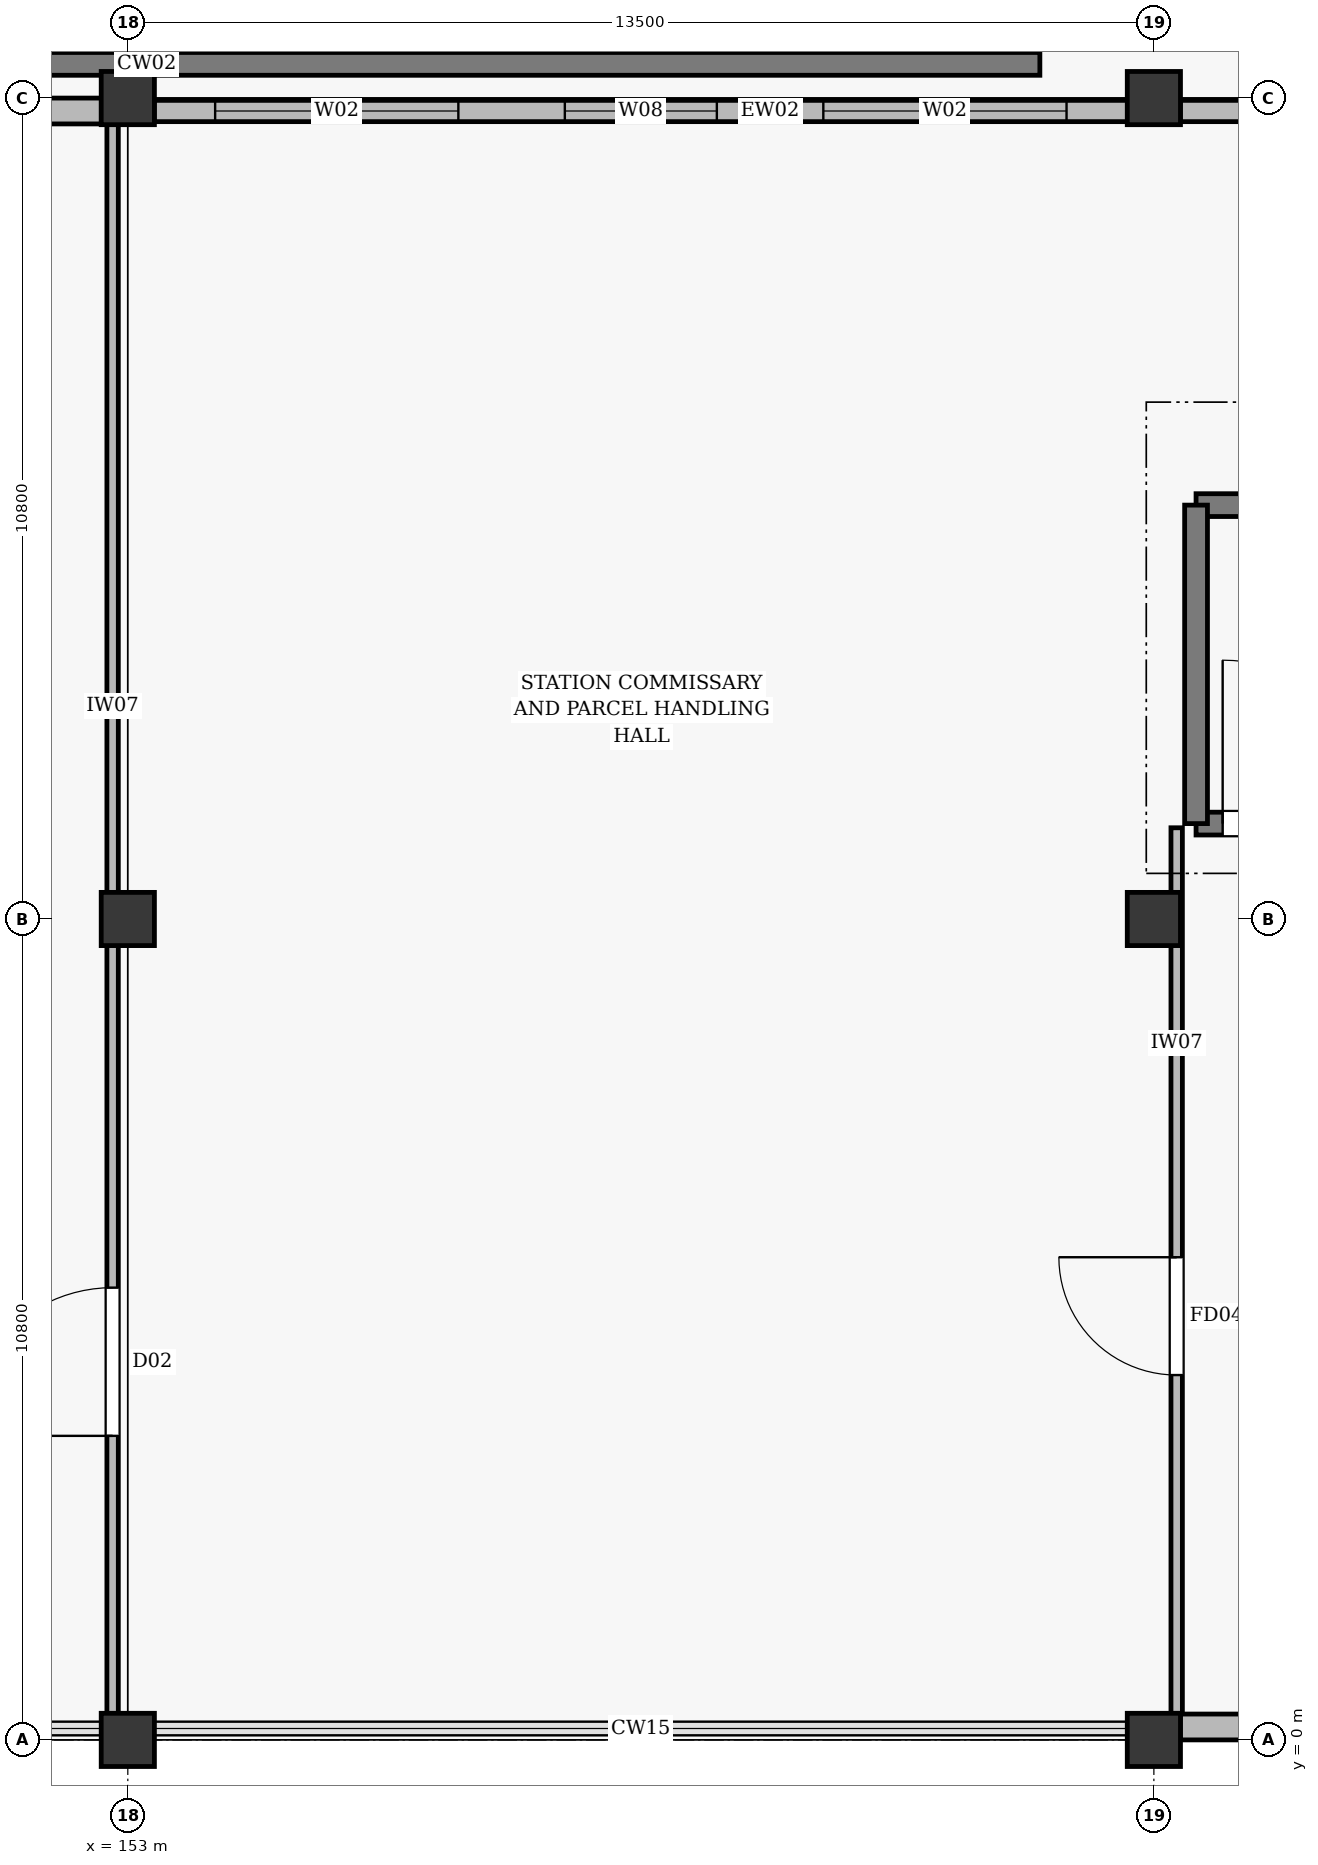
"""IFC4 building model, lengths in metres.
Left out: names, types, materials, properties, quantities, classifications, styles, units other than length and angle.
Written with IfcOpenShell. Run it as: python <this file> out.ifc"""

import sys

from ifc_helpers import new_model, si_unit, direction, frame, frame_2d, origin, origin_2d, place, context, subcontext, project, spatial, rectangle, extrude, element, fill, save


model = new_model("IFC4")
c1 = context("Model", 3, precision=1e-05, world=origin(), true_north=direction((0.0, 1.0)))
c2 = subcontext(c1, "Body", "Model", "MODEL_VIEW")
j1 = project(units=[si_unit("LENGTHUNIT", "METRE"), si_unit("PLANEANGLEUNIT", "RADIAN")], contexts=[c1])
p1 = place(None, origin())
s1 = spatial("IfcSite", under=j1, at=p1, CompositionType="ELEMENT")
p2 = place(p1, origin())
s2 = spatial("IfcBuilding", under=s1, at=p2, CompositionType="ELEMENT")
p3 = place(p2, origin())
s3 = spatial("IfcBuildingStorey", under=s2, at=p3, CompositionType="ELEMENT", Elevation=0.0)
for number, where, z_axis, x_axis in (
    (1, (153.0, 0.0, 0.0), (0.0, 0.0, 1.0), (1.0, 0.0, 0.0)),
    (2, (153.0, 10.8, 0.0), (0.0, 0.0, 1.0), (1.0, 0.0, 0.0)),
    (3, (153.0, 21.6, 0.0), (0.0, 0.0, 1.0), (1.0, 0.0, 0.0)),
    (4, (166.5, 0.0, 0.0), (0.0, 0.0, 1.0), (1.0, 0.0, 0.0)),
    (5, (166.5, 10.8, 0.0), (0.0, 0.0, 1.0), (1.0, 0.0, 0.0)),
    (6, (166.5, 21.6, 0.0), (0.0, 0.0, 1.0), (1.0, 0.0, 0.0)),
):
    element("IfcColumn", number, at=place(p3, frame(where, z_axis=z_axis, x_axis=x_axis)), inside=s3, PredefinedType="COLUMN", context=c2, shape_type="SweptSolid", body=[
        extrude(rectangle(XDim=0.7, YDim=0.7, at=origin_2d()), origin(), (0.0, 0.0, 1.0), 6.6),
    ])
p4 = place(p3, frame((141.5, 22.05, 0.0), z_axis=(0.0, 0.0, 1.0), x_axis=(1.0, 0.0, 0.0)))
e7 = element("IfcWall", 7, at=p4, inside=s3, PredefinedType="SOLIDWALL", context=c2, shape_type="SweptSolid", body=[
    extrude(rectangle(XDim=23.5, YDim=0.3, at=frame_2d((11.75, 0.0))), origin(), (0.0, 0.0, 1.0), 0.375),
])
p5 = place(p3, frame((179.652, 0.17, 0.0), z_axis=(0.0, 0.0, 1.0), x_axis=(-1.0, 0.0, 0.0)))
e8 = element("IfcWall", 8, at=p5, inside=s3, PredefinedType="STANDARD", context=c2, shape_type="SweptSolid", body=[
    extrude(rectangle(XDim=12.804, YDim=0.34, at=frame_2d((6.402, 0.0))), origin(), (0.0, 0.0, 1.0), 5.75),
])
p6 = place(p5, frame((5.8, 0.0, 0.005)))
e9 = element("IfcOpeningElement", 9, at=p6, cuts=e8, PredefinedType="OPENING", context=c2, shape_type="SweptSolid", body=[
    extrude(rectangle(XDim=2.4, YDim=2.5, at=frame_2d((1.2, 1.25))), frame((0.0, 0.182, 0.0), z_axis=(0.0, -1.0, 0.0), x_axis=(1.0, 0.0, 0.0)), (0.0, 0.0, 1.0), 0.364),
])
p7 = place(p5, frame((1.401, 0.0, 0.75)))
e10 = element("IfcOpeningElement", 10, at=p7, cuts=e8, PredefinedType="OPENING", context=c2, shape_type="SweptSolid", body=[
    extrude(rectangle(XDim=2.0, YDim=2.2, at=frame_2d((1.0, 1.1))), frame((0.0, 0.182, 0.0), z_axis=(0.0, -1.0, 0.0), x_axis=(1.0, 0.0, 0.0)), (0.0, 0.0, 1.0), 0.364),
])
p8 = place(p5, frame((9.403, 0.0, 0.75)))
e11 = element("IfcOpeningElement", 11, at=p8, cuts=e8, PredefinedType="OPENING", context=c2, shape_type="SweptSolid", body=[
    extrude(rectangle(XDim=2.0, YDim=2.2, at=frame_2d((1.0, 1.1))), frame((0.0, 0.182, 0.0), z_axis=(0.0, -1.0, 0.0), x_axis=(1.0, 0.0, 0.0)), (0.0, 0.0, 1.0), 0.364),
])
p9 = place(p3, frame((149.048, 21.43, 0.0), z_axis=(0.0, 0.0, 1.0), x_axis=(1.0, 0.0, 0.0)))
e12 = element("IfcWall", 12, at=p9, inside=s3, PredefinedType="STANDARD", context=c2, shape_type="SweptSolid", body=[
    extrude(rectangle(XDim=3.604, YDim=0.34, at=frame_2d((1.802, 0.0))), origin(), (0.0, 0.0, 1.0), 4.28),
])
p10 = place(p9, frame((1.302, 0.0, 1.05)))
e13 = element("IfcOpeningElement", 13, at=p10, cuts=e12, PredefinedType="OPENING", context=c2, shape_type="SweptSolid", body=[
    extrude(rectangle(XDim=1.0, YDim=1.6, at=frame_2d((0.5, 0.8))), frame((0.0, 0.182, 0.0), z_axis=(0.0, -1.0, 0.0), x_axis=(1.0, 0.0, 0.0)), (0.0, 0.0, 1.0), 0.364),
])
p11 = place(p3, frame((153.348, 21.43, 0.0), z_axis=(0.0, 0.0, 1.0), x_axis=(1.0, 0.0, 0.0)))
e14 = element("IfcWall", 14, at=p11, inside=s3, PredefinedType="STANDARD", context=c2, shape_type="SweptSolid", body=[
    extrude(rectangle(XDim=12.804, YDim=0.28, at=frame_2d((6.402, 0.0))), origin(), (0.0, 0.0, 1.0), 5.69),
])
p12 = place(p11, frame((0.801, 0.0, 0.75)))
e15 = element("IfcOpeningElement", 15, at=p12, cuts=e14, PredefinedType="OPENING", context=c2, shape_type="SweptSolid", body=[
    extrude(rectangle(XDim=3.2, YDim=2.8, at=frame_2d((1.6, 1.4))), frame((0.0, 0.152, 0.0), z_axis=(0.0, -1.0, 0.0), x_axis=(1.0, 0.0, 0.0)), (0.0, 0.0, 1.0), 0.304),
])
p13 = place(p11, frame((5.402, 0.0, 0.75)))
e16 = element("IfcOpeningElement", 16, at=p13, cuts=e14, PredefinedType="OPENING", context=c2, shape_type="SweptSolid", body=[
    extrude(rectangle(XDim=2.0, YDim=2.2, at=frame_2d((1.0, 1.1))), frame((0.0, 0.152, 0.0), z_axis=(0.0, -1.0, 0.0), x_axis=(1.0, 0.0, 0.0)), (0.0, 0.0, 1.0), 0.304),
])
p14 = place(p11, frame((8.803, 0.0, 0.75)))
e17 = element("IfcOpeningElement", 17, at=p14, cuts=e14, PredefinedType="OPENING", context=c2, shape_type="SweptSolid", body=[
    extrude(rectangle(XDim=3.2, YDim=2.8, at=frame_2d((1.6, 1.4))), frame((0.0, 0.152, 0.0), z_axis=(0.0, -1.0, 0.0), x_axis=(1.0, 0.0, 0.0)), (0.0, 0.0, 1.0), 0.304),
])
p15 = place(p3, frame((166.848, 21.43, 0.0), z_axis=(0.0, 0.0, 1.0), x_axis=(1.0, 0.0, 0.0)))
e18 = element("IfcWall", 18, at=p15, inside=s3, PredefinedType="STANDARD", context=c2, shape_type="SweptSolid", body=[
    extrude(rectangle(XDim=12.804, YDim=0.28, at=frame_2d((6.402, 0.0))), origin(), (0.0, 0.0, 1.0), 5.69),
])
p16 = place(p15, frame((0.801, 0.0, 0.75)))
e19 = element("IfcOpeningElement", 19, at=p16, cuts=e18, PredefinedType="OPENING", context=c2, shape_type="SweptSolid", body=[
    extrude(rectangle(XDim=3.2, YDim=2.8, at=frame_2d((1.6, 1.4))), frame((0.0, 0.152, 0.0), z_axis=(0.0, -1.0, 0.0), x_axis=(1.0, 0.0, 0.0)), (0.0, 0.0, 1.0), 0.304),
])
p17 = place(p15, frame((5.402, 0.0, 0.75)))
e20 = element("IfcOpeningElement", 20, at=p17, cuts=e18, PredefinedType="OPENING", context=c2, shape_type="SweptSolid", body=[
    extrude(rectangle(XDim=2.0, YDim=2.2, at=frame_2d((1.0, 1.1))), frame((0.0, 0.152, 0.0), z_axis=(0.0, -1.0, 0.0), x_axis=(1.0, 0.0, 0.0)), (0.0, 0.0, 1.0), 0.304),
])
p18 = place(p15, frame((8.803, 0.0, 0.75)))
e21 = element("IfcOpeningElement", 21, at=p18, cuts=e18, PredefinedType="OPENING", context=c2, shape_type="SweptSolid", body=[
    extrude(rectangle(XDim=3.2, YDim=2.8, at=frame_2d((1.6, 1.4))), frame((0.0, 0.152, 0.0), z_axis=(0.0, -1.0, 0.0), x_axis=(1.0, 0.0, 0.0)), (0.0, 0.0, 1.0), 0.304),
])
p19 = place(p3, frame((167.055, 12.055, 0.0), z_axis=(0.0, 0.0, 1.0), x_axis=(1.0, 0.0, 0.0)))
e22 = element("IfcWall", 22, at=p19, inside=s3, PredefinedType="SOLIDWALL", context=c2, shape_type="SweptSolid", body=[
    extrude(rectangle(XDim=10.04, YDim=0.3, at=frame_2d((5.02, 0.0))), origin(), (0.0, 0.0, 1.0), 6.6),
])
p20 = place(p19, frame((0.35, 0.0, 0.005)))
e23 = element("IfcOpeningElement", 23, at=p20, cuts=e22, PredefinedType="OPENING", context=c2, shape_type="SweptSolid", body=[
    extrude(rectangle(XDim=2.15, YDim=2.2, at=frame_2d((1.075, 1.1))), frame((0.0, 0.162, 0.0), z_axis=(0.0, -1.0, 0.0), x_axis=(1.0, 0.0, 0.0)), (0.0, 0.0, 1.0), 0.324),
])
p21 = place(p3, frame((167.055, 16.245, 0.0), z_axis=(0.0, 0.0, 1.0), x_axis=(1.0, 0.0, 0.0)))
e24 = element("IfcWall", 24, at=p21, inside=s3, PredefinedType="SOLIDWALL", context=c2, shape_type="SweptSolid", body=[
    extrude(rectangle(XDim=10.04, YDim=0.3, at=frame_2d((5.02, 0.0))), origin(), (0.0, 0.0, 1.0), 6.6),
])
p22 = place(p3, frame((167.055, 12.055, 0.0), z_axis=(0.0, 0.0, 1.0), x_axis=(0.0, 1.0, 0.0)))
e25 = element("IfcWall", 25, at=p22, inside=s3, PredefinedType="SOLIDWALL", context=c2, shape_type="SweptSolid", body=[
    extrude(rectangle(XDim=4.19, YDim=0.3, at=frame_2d((2.095, 0.0))), origin(), (0.0, 0.0, 1.0), 6.6),
])
p23 = place(p3, frame((152.8, 0.348, 0.0), z_axis=(0.0, 0.0, 1.0), x_axis=(0.0, 1.0, 0.0)))
e26 = element("IfcWall", 26, at=p23, inside=s3, PredefinedType="PARTITIONING", context=c2, shape_type="SweptSolid", body=[
    extrude(rectangle(XDim=20.904, YDim=0.15, at=frame_2d((10.452, 0.0))), origin(), (0.0, 0.0, 1.0), 5.69),
])
p24 = place(p23, frame((3.652, 0.0, 0.005)))
e27 = element("IfcOpeningElement", 27, at=p24, cuts=e26, PredefinedType="OPENING", context=c2, shape_type="SweptSolid", body=[
    extrude(rectangle(XDim=1.95, YDim=2.3, at=frame_2d((0.975, 1.15))), frame((0.0, 0.087, 0.0), z_axis=(0.0, -1.0, 0.0), x_axis=(1.0, 0.0, 0.0)), (0.0, 0.0, 1.0), 0.174),
])
p25 = place(p3, frame((166.8, 0.348, 0.0), z_axis=(0.0, 0.0, 1.0), x_axis=(0.0, 1.0, 0.0)))
e28 = element("IfcWall", 28, at=p25, inside=s3, PredefinedType="PARTITIONING", context=c2, shape_type="SweptSolid", body=[
    extrude(rectangle(XDim=11.652, YDim=0.15, at=frame_2d((5.826, 0.0))), origin(), (0.0, 0.0, 1.0), 5.74),
])
p26 = place(p25, frame((4.452, 0.0, 0.005)))
e29 = element("IfcOpeningElement", 29, at=p26, cuts=e28, PredefinedType="OPENING", context=c2, shape_type="SweptSolid", body=[
    extrude(rectangle(XDim=1.55, YDim=2.2, at=frame_2d((0.775, 1.1))), frame((0.0, 0.087, 0.0), z_axis=(0.0, -1.0, 0.0), x_axis=(1.0, 0.0, 0.0)), (0.0, 0.0, 1.0), 0.174),
])
p27 = place(p12, origin())
e30 = element("IfcWindow", 30, at=p27, inside=s3, PartitioningType="DOUBLE_PANEL_VERTICAL", PredefinedType="WINDOW", context=c2, shape_type="SweptSolid", body=[
    extrude(rectangle(XDim=3.2, YDim=2.8, at=frame_2d((1.6, 1.4))), frame((0.0, 0.03, 0.0), z_axis=(0.0, -1.0, 0.0), x_axis=(1.0, 0.0, 0.0)), (0.0, 0.0, 1.0), 0.06),
])
fill(e15, e30)
p28 = place(p13, origin())
e31 = element("IfcWindow", 31, at=p28, inside=s3, PartitioningType="DOUBLE_PANEL_VERTICAL", PredefinedType="WINDOW", context=c2, shape_type="SweptSolid", body=[
    extrude(rectangle(XDim=2.0, YDim=2.2, at=frame_2d((1.0, 1.1))), frame((0.0, 0.03, 0.0), z_axis=(0.0, -1.0, 0.0), x_axis=(1.0, 0.0, 0.0)), (0.0, 0.0, 1.0), 0.06),
])
fill(e16, e31)
p29 = place(p14, origin())
e32 = element("IfcWindow", 32, at=p29, inside=s3, PartitioningType="DOUBLE_PANEL_VERTICAL", PredefinedType="WINDOW", context=c2, shape_type="SweptSolid", body=[
    extrude(rectangle(XDim=3.2, YDim=2.8, at=frame_2d((1.6, 1.4))), frame((0.0, 0.03, 0.0), z_axis=(0.0, -1.0, 0.0), x_axis=(1.0, 0.0, 0.0)), (0.0, 0.0, 1.0), 0.06),
])
fill(e17, e32)
p30 = place(p20, origin())
e33 = element("IfcDoor", 33, at=p30, inside=s3, OperationType="SINGLE_SWING_LEFT", PredefinedType="DOOR", context=c2, shape_type="SweptSolid", body=[
    extrude(rectangle(XDim=2.15, YDim=2.2, at=frame_2d((1.075, 1.1))), frame((0.0, 0.025, 0.0), z_axis=(0.0, -1.0, 0.0), x_axis=(1.0, 0.0, 0.0)), (0.0, 0.0, 1.0), 0.05),
])
fill(e23, e33)
p31 = place(p24, origin())
e34 = element("IfcDoor", 34, at=p31, inside=s3, OperationType="DOUBLE_DOOR_SINGLE_SWING", PredefinedType="DOOR", context=c2, shape_type="SweptSolid", body=[
    extrude(rectangle(XDim=1.95, YDim=2.3, at=frame_2d((0.975, 1.15))), frame((0.0, 0.025, 0.0), z_axis=(0.0, -1.0, 0.0), x_axis=(1.0, 0.0, 0.0)), (0.0, 0.0, 1.0), 0.05),
])
fill(e27, e34)
p32 = place(p26, origin())
e35 = element("IfcDoor", 35, at=p32, inside=s3, OperationType="SINGLE_SWING_RIGHT", PredefinedType="DOOR", context=c2, shape_type="SweptSolid", body=[
    extrude(rectangle(XDim=1.55, YDim=2.2, at=frame_2d((0.775, 1.1))), frame((0.0, 0.025, 0.0), z_axis=(0.0, -1.0, 0.0), x_axis=(1.0, 0.0, 0.0)), (0.0, 0.0, 1.0), 0.05),
])
fill(e29, e35)
save(model, sys.argv[1])
